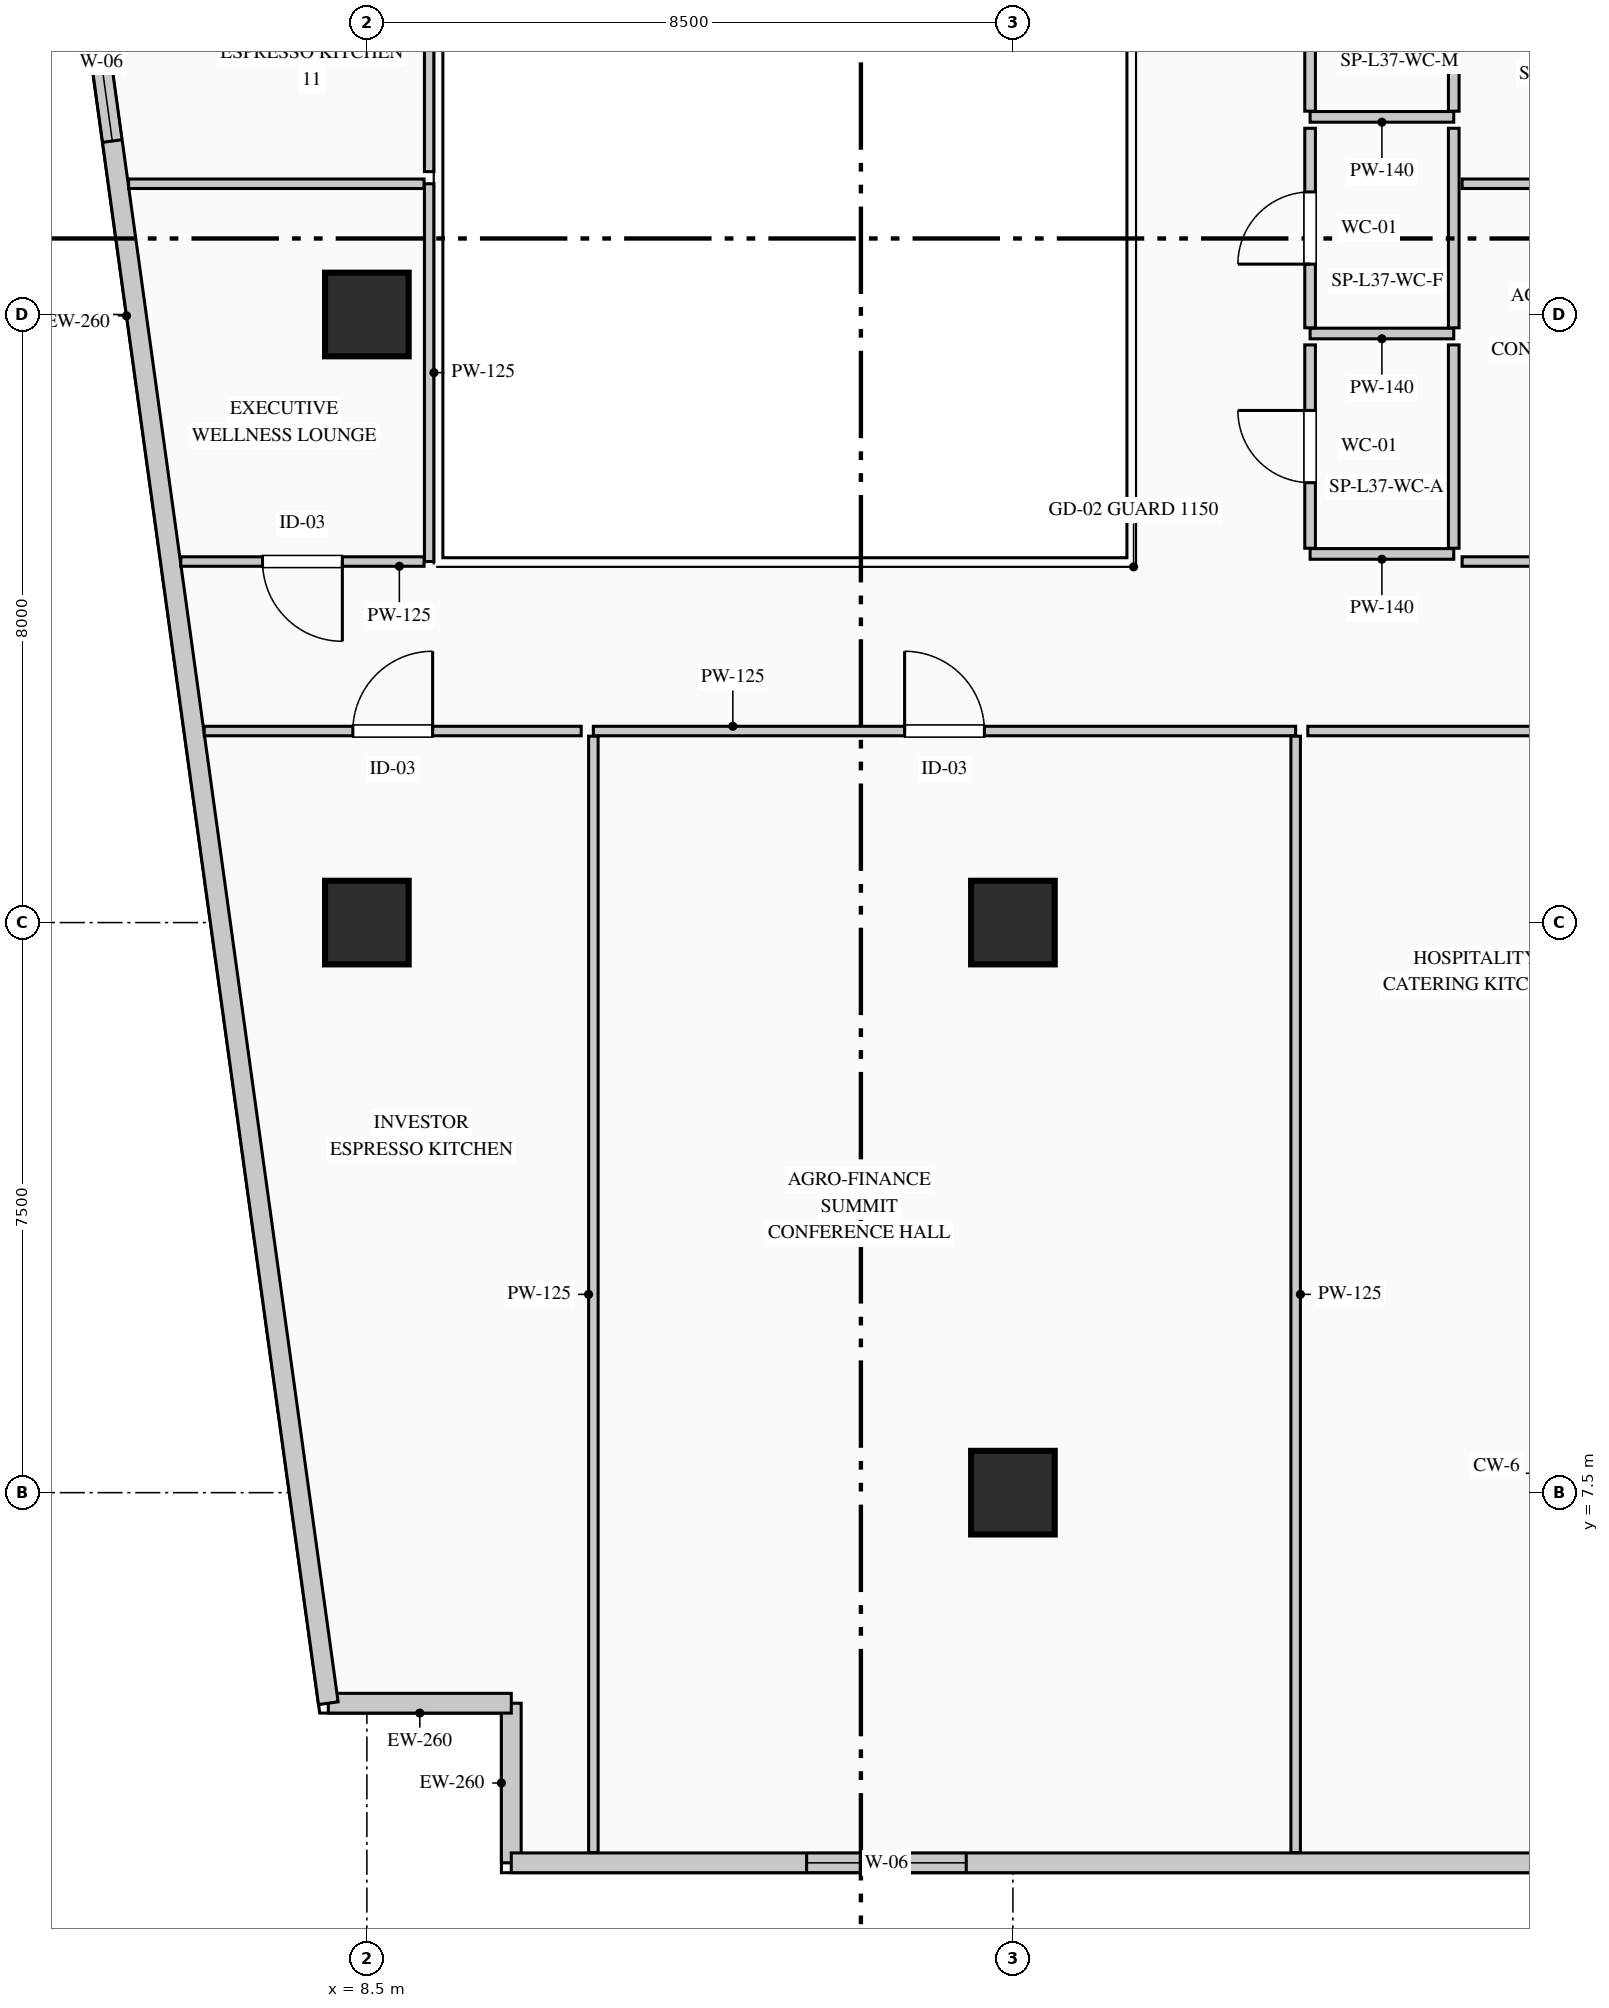
"""IFC4 building model, lengths in metres.
Left out: names, types, materials, properties, quantities, classifications, styles, units other than length and angle.
Written with IfcOpenShell. Run it as: python <this file> out.ifc"""

import sys

from ifc_helpers import new_model, si_unit, direction, frame, frame_2d, origin, origin_2d, place, context, subcontext, project, spatial, rectangle, extrude, element, fill, save


model = new_model("IFC4")
c1 = context("Model", 3, precision=1e-05, world=origin(), true_north=direction((0.0, 1.0)))
c2 = subcontext(c1, "Body", "Model", "MODEL_VIEW")
j1 = project(units=[si_unit("LENGTHUNIT", "METRE"), si_unit("PLANEANGLEUNIT", "RADIAN")], contexts=[c1])
p1 = place(None, origin())
s1 = spatial("IfcSite", under=j1, at=p1, CompositionType="ELEMENT")
p2 = place(p1, origin())
s2 = spatial("IfcBuilding", under=s1, at=p2, CompositionType="ELEMENT")
p3 = place(p2, frame((0.0, 0.0, 158.8)))
s3 = spatial("IfcBuildingStorey", under=s2, at=p3, CompositionType="ELEMENT", Elevation=158.8)
for number, where, z_axis, x_axis in (
    (1, (8.5, 15.0, 0.0), (0.0, 0.0, 1.0), (1.0, 0.0, 0.0)),
    (2, (8.5, 23.0, 0.0), (0.0, 0.0, 1.0), (1.0, 0.0, 0.0)),
    (3, (17.0, 7.5, 0.0), (0.0, 0.0, 1.0), (1.0, 0.0, 0.0)),
    (4, (17.0, 15.0, 0.0), (0.0, 0.0, 1.0), (1.0, 0.0, 0.0)),
):
    element("IfcColumn", number, at=place(p3, frame(where, z_axis=z_axis, x_axis=x_axis)), inside=s3, PredefinedType="COLUMN", context=c2, shape_type="SweptSolid", body=[
        extrude(rectangle(XDim=1.1, YDim=1.1, at=origin_2d()), origin(), (0.0, 0.0, 1.0), 3.95),
    ])
p4 = place(p3, frame((10.4, 2.63, 0.0), z_axis=(0.0, 0.0, 1.0), x_axis=(0.0, 1.0, 0.0)))
e5 = element("IfcWall", 5, at=p4, inside=s3, PredefinedType="STANDARD", context=c2, shape_type="SweptSolid", body=[
    extrude(rectangle(XDim=2.1, YDim=0.26, at=frame_2d((1.05, 0.0))), origin(), (0.0, 0.0, 1.0), 3.69),
])
p5 = place(p3, frame((10.4, 4.73, 0.0), z_axis=(0.0, 0.0, 1.0), x_axis=(-1.0, 0.0, 0.0)))
e6 = element("IfcWall", 6, at=p5, inside=s3, PredefinedType="STANDARD", context=c2, shape_type="SweptSolid", body=[
    extrude(rectangle(XDim=2.407, YDim=0.26, at=frame_2d((1.204, 0.0))), origin(), (0.0, 0.0, 1.0), 3.69),
])
p6 = place(p3, frame((7.993, 4.73, 0.0), z_axis=(0.0, 0.0, 1.0), x_axis=(-0.136989009016, 0.990572567462, 0.0)))
e7 = element("IfcWall", 7, at=p6, inside=s3, PredefinedType="STANDARD", context=c2, shape_type="SweptSolid", body=[
    extrude(rectangle(XDim=36.888, YDim=0.26, at=frame_2d((18.444, 0.0))), origin(), (0.0, 0.0, 1.0), 3.69),
])
p7 = place(p6, frame((20.748, 0.0, 0.9)))
e8 = element("IfcOpeningElement", 8, at=p7, cuts=e7, PredefinedType="OPENING", context=c2, shape_type="SweptSolid", body=[
    extrude(rectangle(XDim=2.1, YDim=2.0, at=frame_2d((1.05, 1.0))), frame((0.0, 0.14, 0.0), z_axis=(0.0, -1.0, 0.0), x_axis=(1.0, 0.0, 0.0)), (0.0, 0.0, 1.0), 0.28),
])
p8 = place(p3, frame((24.11, 2.63, 0.0), z_axis=(0.0, 0.0, 1.0), x_axis=(-1.0, 0.0, 0.0)))
e9 = element("IfcWall", 9, at=p8, inside=s3, PredefinedType="STANDARD", context=c2, shape_type="SweptSolid", body=[
    extrude(rectangle(XDim=13.71, YDim=0.26, at=frame_2d((6.855, 0.0))), origin(), (0.0, 0.0, 1.0), 3.69),
])
p9 = place(p8, frame((7.724, 0.0, 0.9)))
e10 = element("IfcOpeningElement", 10, at=p9, cuts=e9, PredefinedType="OPENING", context=c2, shape_type="SweptSolid", body=[
    extrude(rectangle(XDim=2.1, YDim=2.0, at=frame_2d((1.05, 1.0))), frame((0.0, 0.14, 0.0), z_axis=(0.0, -1.0, 0.0), x_axis=(1.0, 0.0, 0.0)), (0.0, 0.0, 1.0), 0.28),
])
p10 = place(p3, frame((22.8, 25.6, 0.0), z_axis=(0.0, 0.0, 1.0), x_axis=(-1.0, 0.0, 0.0)))
e11 = element("IfcWall", 11, at=p10, inside=s3, PredefinedType="PARTITIONING", context=c2, shape_type="SweptSolid", body=[
    extrude(rectangle(XDim=1.89, YDim=0.14, at=frame_2d((0.945, 0.0))), origin(), (0.0, 0.0, 1.0), 3.69),
])
p11 = place(p3, frame((20.91, 25.675, 0.0), z_axis=(0.0, 0.0, 1.0), x_axis=(0.0, 1.0, 0.0)))
e12 = element("IfcWall", 12, at=p11, inside=s3, PredefinedType="PARTITIONING", context=c2, shape_type="SweptSolid", body=[
    extrude(rectangle(XDim=2.775, YDim=0.14, at=frame_2d((1.387, 0.0))), origin(), (0.0, 0.0, 1.0), 3.69),
])
p12 = place(p11, frame((0.913, 0.0, 0.0)))
e13 = element("IfcOpeningElement", 13, at=p12, cuts=e12, PredefinedType="OPENING", context=c2, shape_type="SweptSolid", body=[
    extrude(rectangle(XDim=0.95, YDim=2.15, at=frame_2d((0.475, 1.075))), frame((0.0, 0.08, 0.0), z_axis=(0.0, -1.0, 0.0), x_axis=(1.0, 0.0, 0.0)), (0.0, 0.0, 1.0), 0.16),
])
p13 = place(p3, frame((22.8, 28.375, 0.0), z_axis=(0.0, 0.0, 1.0), x_axis=(0.0, -1.0, 0.0)))
e14 = element("IfcWall", 14, at=p13, inside=s3, PredefinedType="PARTITIONING", context=c2, shape_type="SweptSolid", body=[
    extrude(rectangle(XDim=2.7, YDim=0.14, at=frame_2d((1.35, 0.0))), origin(), (0.0, 0.0, 1.0), 3.375),
])
p14 = place(p3, frame((22.8, 22.75, 0.0), z_axis=(0.0, 0.0, 1.0), x_axis=(-1.0, 0.0, 0.0)))
e15 = element("IfcWall", 15, at=p14, inside=s3, PredefinedType="PARTITIONING", context=c2, shape_type="SweptSolid", body=[
    extrude(rectangle(XDim=1.89, YDim=0.14, at=frame_2d((0.945, 0.0))), origin(), (0.0, 0.0, 1.0), 3.69),
])
p15 = place(p3, frame((20.91, 22.825, 0.0), z_axis=(0.0, 0.0, 1.0), x_axis=(0.0, 1.0, 0.0)))
e16 = element("IfcWall", 16, at=p15, inside=s3, PredefinedType="PARTITIONING", context=c2, shape_type="SweptSolid", body=[
    extrude(rectangle(XDim=2.625, YDim=0.14, at=frame_2d((1.312, 0.0))), origin(), (0.0, 0.0, 1.0), 3.69),
])
p16 = place(p15, frame((0.837, 0.0, 0.0)))
e17 = element("IfcOpeningElement", 17, at=p16, cuts=e16, PredefinedType="OPENING", context=c2, shape_type="SweptSolid", body=[
    extrude(rectangle(XDim=0.95, YDim=2.15, at=frame_2d((0.475, 1.075))), frame((0.0, 0.08, 0.0), z_axis=(0.0, -1.0, 0.0), x_axis=(1.0, 0.0, 0.0)), (0.0, 0.0, 1.0), 0.16),
])
p17 = place(p3, frame((22.8, 25.45, 0.0), z_axis=(0.0, 0.0, 1.0), x_axis=(0.0, -1.0, 0.0)))
e18 = element("IfcWall", 18, at=p17, inside=s3, PredefinedType="PARTITIONING", context=c2, shape_type="SweptSolid", body=[
    extrude(rectangle(XDim=2.625, YDim=0.14, at=frame_2d((1.312, 0.0))), origin(), (0.0, 0.0, 1.0), 3.375),
])
p18 = place(p3, frame((22.8, 19.85, 0.0), z_axis=(0.0, 0.0, 1.0), x_axis=(-1.0, 0.0, 0.0)))
e19 = element("IfcWall", 19, at=p18, inside=s3, PredefinedType="PARTITIONING", context=c2, shape_type="SweptSolid", body=[
    extrude(rectangle(XDim=1.89, YDim=0.14, at=frame_2d((0.945, 0.0))), origin(), (0.0, 0.0, 1.0), 3.69),
])
p19 = place(p3, frame((20.91, 19.925, 0.0), z_axis=(0.0, 0.0, 1.0), x_axis=(0.0, 1.0, 0.0)))
e20 = element("IfcWall", 20, at=p19, inside=s3, PredefinedType="PARTITIONING", context=c2, shape_type="SweptSolid", body=[
    extrude(rectangle(XDim=2.675, YDim=0.14, at=frame_2d((1.337, 0.0))), origin(), (0.0, 0.0, 1.0), 3.69),
])
p20 = place(p19, frame((0.863, 0.0, 0.0)))
e21 = element("IfcOpeningElement", 21, at=p20, cuts=e20, PredefinedType="OPENING", context=c2, shape_type="SweptSolid", body=[
    extrude(rectangle(XDim=0.95, YDim=2.15, at=frame_2d((0.475, 1.075))), frame((0.0, 0.08, 0.0), z_axis=(0.0, -1.0, 0.0), x_axis=(1.0, 0.0, 0.0)), (0.0, 0.0, 1.0), 0.16),
])
p21 = place(p3, frame((22.8, 22.6, 0.0), z_axis=(0.0, 0.0, 1.0), x_axis=(0.0, -1.0, 0.0)))
e22 = element("IfcWall", 22, at=p21, inside=s3, PredefinedType="PARTITIONING", context=c2, shape_type="SweptSolid", body=[
    extrude(rectangle(XDim=2.675, YDim=0.14, at=frame_2d((1.337, 0.0))), origin(), (0.0, 0.0, 1.0), 3.375),
])
p22 = place(p3, frame((11.48, 17.52, 0.0), z_axis=(0.0, 0.0, 1.0), x_axis=(1.0, 0.0, 0.0)))
e23 = element("IfcWall", 23, at=p22, inside=s3, PredefinedType="PARTITIONING", context=c2, shape_type="SweptSolid", body=[
    extrude(rectangle(XDim=9.24, YDim=0.125, at=frame_2d((4.62, 0.0))), origin(), (0.0, 0.0, 1.0), 3.69),
])
p23 = place(p22, frame((4.095, 0.0, 0.0)))
e24 = element("IfcOpeningElement", 24, at=p23, cuts=e23, PredefinedType="OPENING", context=c2, shape_type="SweptSolid", body=[
    extrude(rectangle(XDim=1.05, YDim=2.15, at=frame_2d((0.525, 1.075))), frame((0.0, 0.073, 0.0), z_axis=(0.0, -1.0, 0.0), x_axis=(1.0, 0.0, 0.0)), (0.0, 0.0, 1.0), 0.145),
])
for number, where, z_axis, x_axis in (
    (25, (20.72, 17.452, 0.0), (0.0, 0.0, 1.0), (0.0, -1.0, 0.0)),
    (26, (11.48, 2.765, 0.0), (0.0, 0.0, 1.0), (0.0, 1.0, 0.0)),
):
    element("IfcWall", number, at=place(p3, frame(where, z_axis=z_axis, x_axis=x_axis)), inside=s3, PredefinedType="PARTITIONING", context=c2, shape_type="SweptSolid", body=[
        extrude(rectangle(XDim=14.688, YDim=0.125, at=frame_2d((7.344, 0.0))), origin(), (0.0, 0.0, 1.0), 3.69),
    ])
p24 = place(p3, frame((6.36, 17.52, 0.0), z_axis=(0.0, 0.0, 1.0), x_axis=(1.0, 0.0, 0.0)))
e27 = element("IfcWall", 27, at=p24, inside=s3, PredefinedType="PARTITIONING", context=c2, shape_type="SweptSolid", body=[
    extrude(rectangle(XDim=4.96, YDim=0.125, at=frame_2d((2.48, 0.0))), origin(), (0.0, 0.0, 1.0), 3.69),
])
p25 = place(p24, frame((1.955, 0.0, 0.0)))
e28 = element("IfcOpeningElement", 28, at=p25, cuts=e27, PredefinedType="OPENING", context=c2, shape_type="SweptSolid", body=[
    extrude(rectangle(XDim=1.05, YDim=2.15, at=frame_2d((0.525, 1.075))), frame((0.0, 0.073, 0.0), z_axis=(0.0, -1.0, 0.0), x_axis=(1.0, 0.0, 0.0)), (0.0, 0.0, 1.0), 0.145),
])
p26 = place(p3, frame((20.88, 17.52, 0.0), z_axis=(0.0, 0.0, 1.0), x_axis=(1.0, 0.0, 0.0)))
e29 = element("IfcWall", 29, at=p26, inside=s3, PredefinedType="PARTITIONING", context=c2, shape_type="SweptSolid", body=[
    extrude(rectangle(XDim=9.24, YDim=0.125, at=frame_2d((4.62, 0.0))), origin(), (0.0, 0.0, 1.0), 3.375),
])
p27 = place(p26, frame((4.095, 0.0, 0.0)))
e30 = element("IfcOpeningElement", 30, at=p27, cuts=e29, PredefinedType="OPENING", context=c2, shape_type="SweptSolid", body=[
    extrude(rectangle(XDim=1.05, YDim=2.15, at=frame_2d((0.525, 1.075))), frame((0.0, 0.073, 0.0), z_axis=(0.0, -1.0, 0.0), x_axis=(1.0, 0.0, 0.0)), (0.0, 0.0, 1.0), 0.145),
])
p28 = place(p3, frame((9.32, 24.72, 0.0), z_axis=(0.0, 0.0, 1.0), x_axis=(0.0, -1.0, 0.0)))
e31 = element("IfcWall", 31, at=p28, inside=s3, PredefinedType="PARTITIONING", context=c2, shape_type="SweptSolid", body=[
    extrude(rectangle(XDim=4.97, YDim=0.125, at=frame_2d((2.485, 0.0))), origin(), (0.0, 0.0, 1.0), 3.375),
])
p29 = place(p3, frame((9.252, 19.75, 0.0), z_axis=(0.0, 0.0, 1.0), x_axis=(-1.0, 0.0, 0.0)))
e32 = element("IfcWall", 32, at=p29, inside=s3, PredefinedType="PARTITIONING", context=c2, shape_type="SweptSolid", body=[
    extrude(rectangle(XDim=3.2, YDim=0.125, at=frame_2d((1.6, 0.0))), origin(), (0.0, 0.0, 1.0), 3.69),
])
p30 = place(p29, frame((1.075, 0.0, 0.0)))
e33 = element("IfcOpeningElement", 33, at=p30, cuts=e32, PredefinedType="OPENING", context=c2, shape_type="SweptSolid", body=[
    extrude(rectangle(XDim=1.05, YDim=2.15, at=frame_2d((0.525, 1.075))), frame((0.0, 0.073, 0.0), z_axis=(0.0, -1.0, 0.0), x_axis=(1.0, 0.0, 0.0)), (0.0, 0.0, 1.0), 0.145),
])
p31 = place(p3, frame((5.365, 24.72, 0.0), z_axis=(0.0, 0.0, 1.0), x_axis=(1.0, 0.0, 0.0)))
e34 = element("IfcWall", 34, at=p31, inside=s3, PredefinedType="PARTITIONING", context=c2, shape_type="SweptSolid", body=[
    extrude(rectangle(XDim=3.888, YDim=0.125, at=frame_2d((1.944, 0.0))), origin(), (0.0, 0.0, 1.0), 3.69),
])
p32 = place(p3, frame((25.976, 19.75, 0.0), z_axis=(0.0, 0.0, 1.0), x_axis=(-1.0, 0.0, 0.0)))
e35 = element("IfcWall", 35, at=p32, inside=s3, PredefinedType="PARTITIONING", context=c2, shape_type="SweptSolid", body=[
    extrude(rectangle(XDim=3.066, YDim=0.125, at=frame_2d((1.533, 0.0))), origin(), (0.0, 0.0, 1.0), 3.69),
])
p33 = place(p32, frame((1.008, 0.0, 0.0)))
e36 = element("IfcOpeningElement", 36, at=p33, cuts=e35, PredefinedType="OPENING", context=c2, shape_type="SweptSolid", body=[
    extrude(rectangle(XDim=1.05, YDim=2.15, at=frame_2d((0.525, 1.075))), frame((0.0, 0.073, 0.0), z_axis=(0.0, -1.0, 0.0), x_axis=(1.0, 0.0, 0.0)), (0.0, 0.0, 1.0), 0.145),
])
p34 = place(p3, frame((22.91, 24.72, 0.0), z_axis=(0.0, 0.0, 1.0), x_axis=(1.0, 0.0, 0.0)))
e37 = element("IfcWall", 37, at=p34, inside=s3, PredefinedType="PARTITIONING", context=c2, shape_type="SweptSolid", body=[
    extrude(rectangle(XDim=7.21, YDim=0.125, at=frame_2d((3.605, 0.0))), origin(), (0.0, 0.0, 1.0), 3.375),
])
p35 = place(p3, frame((9.32, 28.502, 0.0), z_axis=(0.0, 0.0, 1.0), x_axis=(0.0, -1.0, 0.0)))
e38 = element("IfcWall", 38, at=p35, inside=s3, PredefinedType="PARTITIONING", context=c2, shape_type="SweptSolid", body=[
    extrude(rectangle(XDim=3.623, YDim=0.125, at=frame_2d((1.811, 0.0))), origin(), (0.0, 0.0, 1.0), 3.375),
])
p36 = place(p7, origin())
e39 = element("IfcWindow", 39, at=p36, inside=s3, PartitioningType="DOUBLE_PANEL_VERTICAL", PredefinedType="WINDOW", context=c2, shape_type="SweptSolid", body=[
    extrude(rectangle(XDim=2.1, YDim=2.0, at=frame_2d((1.05, 1.0))), frame((0.0, 0.03, 0.0), z_axis=(0.0, -1.0, 0.0), x_axis=(1.0, 0.0, 0.0)), (0.0, 0.0, 1.0), 0.06),
])
fill(e8, e39)
p37 = place(p9, origin())
e40 = element("IfcWindow", 40, at=p37, inside=s3, PartitioningType="DOUBLE_PANEL_VERTICAL", PredefinedType="WINDOW", context=c2, shape_type="SweptSolid", body=[
    extrude(rectangle(XDim=2.1, YDim=2.0, at=frame_2d((1.05, 1.0))), frame((0.0, 0.03, 0.0), z_axis=(0.0, -1.0, 0.0), x_axis=(1.0, 0.0, 0.0)), (0.0, 0.0, 1.0), 0.06),
])
fill(e10, e40)
p38 = place(p16, origin())
e41 = element("IfcDoor", 41, at=p38, inside=s3, OperationType="SINGLE_SWING_LEFT", PredefinedType="DOOR", context=c2, shape_type="SweptSolid", body=[
    extrude(rectangle(XDim=0.95, YDim=2.15, at=frame_2d((0.475, 1.075))), frame((0.0, 0.025, 0.0), z_axis=(0.0, -1.0, 0.0), x_axis=(1.0, 0.0, 0.0)), (0.0, 0.0, 1.0), 0.05),
])
fill(e17, e41)
p39 = place(p20, origin())
e42 = element("IfcDoor", 42, at=p39, inside=s3, OperationType="SINGLE_SWING_RIGHT", PredefinedType="DOOR", context=c2, shape_type="SweptSolid", body=[
    extrude(rectangle(XDim=0.95, YDim=2.15, at=frame_2d((0.475, 1.075))), frame((0.0, 0.025, 0.0), z_axis=(0.0, -1.0, 0.0), x_axis=(1.0, 0.0, 0.0)), (0.0, 0.0, 1.0), 0.05),
])
fill(e21, e42)
p40 = place(p23, origin())
e43 = element("IfcDoor", 43, at=p40, inside=s3, OperationType="SINGLE_SWING_LEFT", PredefinedType="DOOR", context=c2, shape_type="SweptSolid", body=[
    extrude(rectangle(XDim=1.05, YDim=2.15, at=frame_2d((0.525, 1.075))), frame((0.0, 0.025, 0.0), z_axis=(0.0, -1.0, 0.0), x_axis=(1.0, 0.0, 0.0)), (0.0, 0.0, 1.0), 0.05),
])
fill(e24, e43)
p41 = place(p25, origin())
e44 = element("IfcDoor", 44, at=p41, inside=s3, OperationType="SINGLE_SWING_RIGHT", PredefinedType="DOOR", context=c2, shape_type="SweptSolid", body=[
    extrude(rectangle(XDim=1.05, YDim=2.15, at=frame_2d((0.525, 1.075))), frame((0.0, 0.025, 0.0), z_axis=(0.0, -1.0, 0.0), x_axis=(1.0, 0.0, 0.0)), (0.0, 0.0, 1.0), 0.05),
])
fill(e28, e44)
p42 = place(p30, origin())
e45 = element("IfcDoor", 45, at=p42, inside=s3, OperationType="SINGLE_SWING_LEFT", PredefinedType="DOOR", context=c2, shape_type="SweptSolid", body=[
    extrude(rectangle(XDim=1.05, YDim=2.15, at=frame_2d((0.525, 1.075))), frame((0.0, 0.025, 0.0), z_axis=(0.0, -1.0, 0.0), x_axis=(1.0, 0.0, 0.0)), (0.0, 0.0, 1.0), 0.05),
])
fill(e33, e45)
save(model, sys.argv[1])
